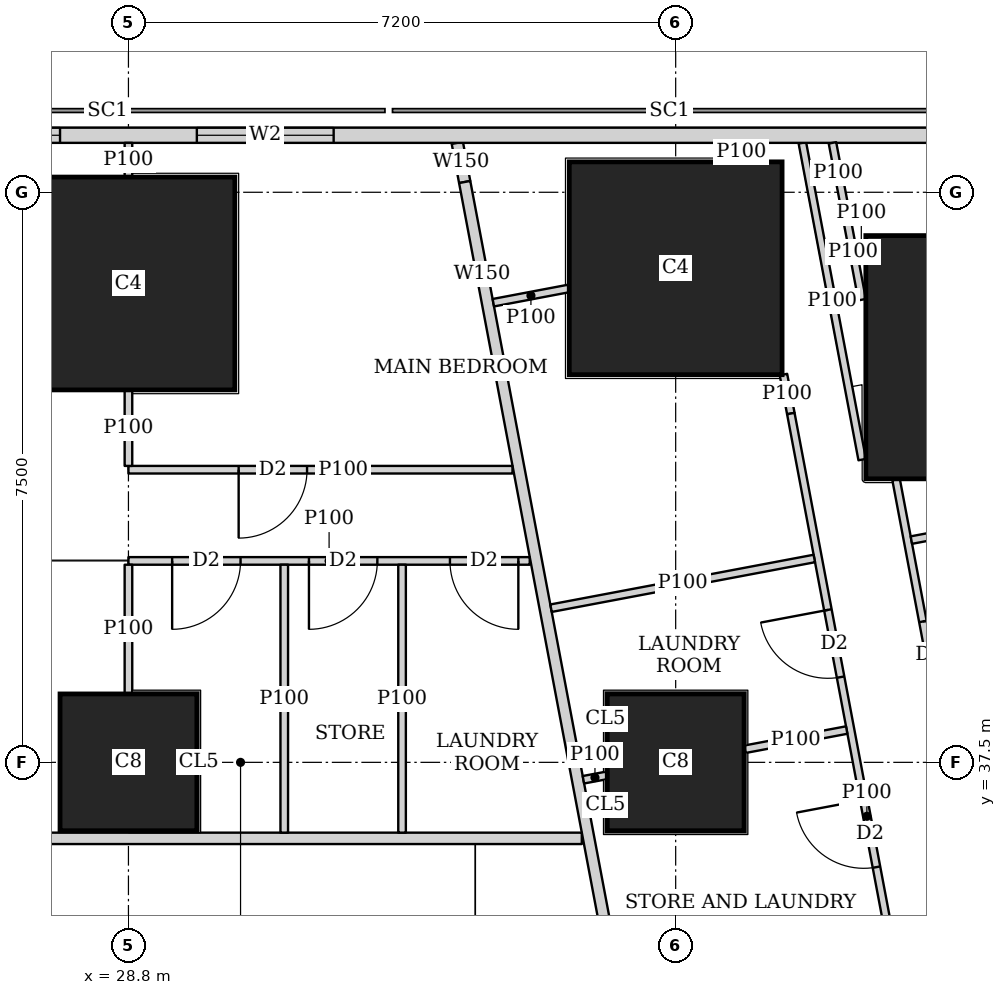
"""IFC4 building model, lengths in metres.
Left out: names, types, materials, properties, quantities, classifications, styles, units other than length and angle.
Written with IfcOpenShell. Run it as: python <this file> out.ifc"""

import sys

from ifc_helpers import new_model, si_unit, direction, frame, frame_2d, origin, origin_2d, place, context, subcontext, project, spatial, rectangle, extrude, element, fill, save


model = new_model("IFC4")
c1 = context("Model", 3, precision=1e-05, world=origin(), true_north=direction((0.0, 1.0)))
c2 = subcontext(c1, "Body", "Model", "MODEL_VIEW")
j1 = project(units=[si_unit("LENGTHUNIT", "METRE"), si_unit("PLANEANGLEUNIT", "RADIAN")], contexts=[c1])
p1 = place(None, origin())
s1 = spatial("IfcSite", under=j1, at=p1, CompositionType="ELEMENT")
p2 = place(p1, origin())
s2 = spatial("IfcBuilding", under=s1, at=p2, CompositionType="ELEMENT")
p3 = place(p2, frame((0.0, 0.0, 68.75)))
s3 = spatial("IfcBuildingStorey", under=s2, at=p3, CompositionType="ELEMENT", Elevation=68.75)
for number, where, z_axis, x_axis in (
    (1, (28.8, 37.5, 0.0), (0.0, 0.0, 1.0), (1.0, 0.0, 0.0)),
    (2, (36.0, 37.5, 0.0), (0.0, 0.0, 1.0), (1.0, 0.0, 0.0)),
):
    element("IfcColumn", number, at=place(p3, frame(where, z_axis=z_axis, x_axis=x_axis)), inside=s3, PredefinedType="COLUMN", context=c2, shape_type="SweptSolid", body=[
        extrude(rectangle(XDim=1.8, YDim=1.8, at=origin_2d()), origin(), (0.0, 0.0, 1.0), 3.75),
    ])
p4 = place(p3, frame((40.102, 42.83, 0.0), z_axis=(0.0, 0.0, 1.0), x_axis=(1.0, 0.0, 0.0)))
e3 = element("IfcColumn", 3, at=p4, inside=s3, PredefinedType="COLUMN", context=c2, shape_type="SweptSolid", body=[
    extrude(rectangle(XDim=3.2, YDim=3.2, at=origin_2d()), origin(), (0.0, 0.0, 1.0), 3.75),
])
for number, where, z_axis, x_axis in (
    (4, (28.8, 43.8, 0.0), (0.0, 0.0, 1.0), (1.0, 0.0, 0.0)),
    (5, (36.0, 44.0, 0.0), (0.0, 0.0, 1.0), (1.0, 0.0, 0.0)),
):
    element("IfcColumn", number, at=place(p3, frame(where, z_axis=z_axis, x_axis=x_axis)), inside=s3, PredefinedType="COLUMN", context=c2, shape_type="SweptSolid", body=[
        extrude(rectangle(XDim=2.8, YDim=2.8, at=origin_2d()), origin(), (0.0, 0.0, 1.0), 3.75),
    ])
p5 = place(p3, frame((40.106, 45.75, 0.0), z_axis=(0.0, 0.0, 1.0), x_axis=(-1.0, 0.0, 0.0)))
e6 = element("IfcWall", 6, at=p5, inside=s3, PredefinedType="SOLIDWALL", context=c2, shape_type="SweptSolid", body=[
    extrude(rectangle(XDim=37.943, YDim=0.2, at=frame_2d((18.971, 0.0))), origin(), (0.0, 0.0, 1.0), 3.45),
])
p6 = place(p5, frame((8.606, 0.0, 0.9)))
e7 = element("IfcOpeningElement", 7, at=p6, cuts=e6, PredefinedType="OPENING", context=c2, shape_type="SweptSolid", body=[
    extrude(rectangle(XDim=1.8, YDim=1.5, at=frame_2d((0.9, 0.75))), frame((0.0, 0.11, 0.0), z_axis=(0.0, -1.0, 0.0), x_axis=(1.0, 0.0, 0.0)), (0.0, 0.0, 1.0), 0.22),
])
p7 = place(p5, frame((12.206, 0.0, 0.9)))
e8 = element("IfcOpeningElement", 8, at=p7, cuts=e6, PredefinedType="OPENING", context=c2, shape_type="SweptSolid", body=[
    extrude(rectangle(XDim=1.8, YDim=1.5, at=frame_2d((0.9, 0.75))), frame((0.0, 0.11, 0.0), z_axis=(0.0, -1.0, 0.0), x_axis=(1.0, 0.0, 0.0)), (0.0, 0.0, 1.0), 0.22),
])
p8 = place(p5, frame((15.806, 0.0, 0.9)))
e9 = element("IfcOpeningElement", 9, at=p8, cuts=e6, PredefinedType="OPENING", context=c2, shape_type="SweptSolid", body=[
    extrude(rectangle(XDim=1.8, YDim=1.5, at=frame_2d((0.9, 0.75))), frame((0.0, 0.11, 0.0), z_axis=(0.0, -1.0, 0.0), x_axis=(1.0, 0.0, 0.0)), (0.0, 0.0, 1.0), 0.22),
])
p9 = place(p5, frame((19.406, 0.0, 0.9)))
e10 = element("IfcOpeningElement", 10, at=p9, cuts=e6, PredefinedType="OPENING", context=c2, shape_type="SweptSolid", body=[
    extrude(rectangle(XDim=1.8, YDim=1.5, at=frame_2d((0.9, 0.75))), frame((0.0, 0.11, 0.0), z_axis=(0.0, -1.0, 0.0), x_axis=(1.0, 0.0, 0.0)), (0.0, 0.0, 1.0), 0.22),
])
p10 = place(p5, frame((23.006, 0.0, 0.9)))
e11 = element("IfcOpeningElement", 11, at=p10, cuts=e6, PredefinedType="OPENING", context=c2, shape_type="SweptSolid", body=[
    extrude(rectangle(XDim=1.8, YDim=1.5, at=frame_2d((0.9, 0.75))), frame((0.0, 0.11, 0.0), z_axis=(0.0, -1.0, 0.0), x_axis=(1.0, 0.0, 0.0)), (0.0, 0.0, 1.0), 0.22),
])
p11 = place(p5, frame((26.606, 0.0, 0.9)))
e12 = element("IfcOpeningElement", 12, at=p11, cuts=e6, PredefinedType="OPENING", context=c2, shape_type="SweptSolid", body=[
    extrude(rectangle(XDim=1.8, YDim=1.5, at=frame_2d((0.9, 0.75))), frame((0.0, 0.11, 0.0), z_axis=(0.0, -1.0, 0.0), x_axis=(1.0, 0.0, 0.0)), (0.0, 0.0, 1.0), 0.22),
])
p12 = place(p3, frame((8.35, 36.5, 0.0), z_axis=(0.0, 0.0, 1.0), x_axis=(1.0, 0.0, 0.0)))
e13 = element("IfcWall", 13, at=p12, inside=s3, PredefinedType="SOLIDWALL", context=c2, shape_type="SweptSolid", body=[
    extrude(rectangle(XDim=26.415, YDim=0.15, at=frame_2d((13.208, 0.0))), origin(), (0.0, 0.0, 1.0), 3.45),
])
p13 = place(p12, frame((2.6, 0.0, 0.0)))
e14 = element("IfcOpeningElement", 14, at=p13, cuts=e13, PredefinedType="OPENING", context=c2, shape_type="SweptSolid", body=[
    extrude(rectangle(XDim=1.0, YDim=2.1, at=frame_2d((0.5, 1.05))), frame((0.0, 0.085, 0.0), z_axis=(0.0, -1.0, 0.0), x_axis=(1.0, 0.0, 0.0)), (0.0, 0.0, 1.0), 0.17),
])
p14 = place(p12, frame((10.949, 0.0, 0.0)))
e15 = element("IfcOpeningElement", 15, at=p14, cuts=e13, PredefinedType="OPENING", context=c2, shape_type="SweptSolid", body=[
    extrude(rectangle(XDim=1.0, YDim=2.1, at=frame_2d((0.5, 1.05))), frame((0.0, 0.085, 0.0), z_axis=(0.0, -1.0, 0.0), x_axis=(1.0, 0.0, 0.0)), (0.0, 0.0, 1.0), 0.17),
])
p15 = place(p12, frame((18.149, 0.0, 0.0)))
e16 = element("IfcOpeningElement", 16, at=p15, cuts=e13, PredefinedType="OPENING", context=c2, shape_type="SweptSolid", body=[
    extrude(rectangle(XDim=1.0, YDim=2.1, at=frame_2d((0.5, 1.05))), frame((0.0, 0.085, 0.0), z_axis=(0.0, -1.0, 0.0), x_axis=(1.0, 0.0, 0.0)), (0.0, 0.0, 1.0), 0.17),
])
p16 = place(p3, frame((33.127, 45.65, 0.0), z_axis=(0.0, 0.0, 1.0), x_axis=(0.185441815104, -0.982655246366, 0.0)))
e17 = element("IfcWall", 17, at=p16, inside=s3, PredefinedType="SOLIDWALL", context=c2, shape_type="SweptSolid", body=[
    extrude(rectangle(XDim=0.524, YDim=0.15, at=frame_2d((0.262, 0.0))), origin(), (0.0, 0.0, 1.0), 3.45),
])
p17 = place(p3, frame((33.224, 45.135, 0.0), z_axis=(0.0, 0.0, 1.0), x_axis=(0.185681462868, -0.982609990967, 0.0)))
e18 = element("IfcWall", 18, at=p17, inside=s3, PredefinedType="SOLIDWALL", context=c2, shape_type="SweptSolid", body=[
    extrude(rectangle(XDim=2.455, YDim=0.15, at=frame_2d((1.228, 0.0))), origin(), (0.0, 0.0, 1.0), 2.0),
])
p18 = place(p3, frame((33.68, 42.723, 0.0), z_axis=(0.0, 0.0, 1.0), x_axis=(0.185624129307, -0.98262082342, 0.0)))
e19 = element("IfcWall", 19, at=p18, inside=s3, PredefinedType="SOLIDWALL", context=c2, shape_type="SweptSolid", body=[
    extrude(rectangle(XDim=41.051, YDim=0.15, at=frame_2d((20.526, 0.0))), origin(), (0.0, 0.0, 1.0), 2.45),
])
p19 = place(p18, frame((13.577, 0.0, 0.0)))
e20 = element("IfcOpeningElement", 20, at=p19, cuts=e19, PredefinedType="OPENING", context=c2, shape_type="SweptSolid", body=[
    extrude(rectangle(XDim=1.0, YDim=2.1, at=frame_2d((0.5, 1.05))), frame((0.0, 0.085, 0.0), z_axis=(0.0, -1.0, 0.0), x_axis=(1.0, 0.0, 0.0)), (0.0, 0.0, 1.0), 0.17),
])
p20 = place(p18, frame((17.394, 0.0, 0.0)))
e21 = element("IfcOpeningElement", 21, at=p20, cuts=e19, PredefinedType="OPENING", context=c2, shape_type="SweptSolid", body=[
    extrude(rectangle(XDim=1.0, YDim=2.1, at=frame_2d((0.5, 1.05))), frame((0.0, 0.085, 0.0), z_axis=(0.0, -1.0, 0.0), x_axis=(1.0, 0.0, 0.0)), (0.0, 0.0, 1.0), 0.17),
])
p21 = place(p18, frame((26.758, 0.0, 0.0)))
e22 = element("IfcOpeningElement", 22, at=p21, cuts=e19, PredefinedType="OPENING", context=c2, shape_type="SweptSolid", body=[
    extrude(rectangle(XDim=1.0, YDim=2.1, at=frame_2d((0.5, 1.05))), frame((0.0, 0.085, 0.0), z_axis=(0.0, -1.0, 0.0), x_axis=(1.0, 0.0, 0.0)), (0.0, 0.0, 1.0), 0.17),
])
p22 = place(p18, frame((32.193, 0.0, 0.0)))
e23 = element("IfcOpeningElement", 23, at=p22, cuts=e19, PredefinedType="OPENING", context=c2, shape_type="SweptSolid", body=[
    extrude(rectangle(XDim=1.0, YDim=2.1, at=frame_2d((0.5, 1.05))), frame((0.0, 0.085, 0.0), z_axis=(0.0, -1.0, 0.0), x_axis=(1.0, 0.0, 0.0)), (0.0, 0.0, 1.0), 0.17),
])
p23 = place(p3, frame((38.454, 41.483, 0.0), z_axis=(0.0, 0.0, 1.0), x_axis=(-0.185609245326, 0.982623634994, 0.0)))
e24 = element("IfcWall", 24, at=p23, inside=s3, PredefinedType="PARTITIONING", context=c2, shape_type="SweptSolid", body=[
    extrude(rectangle(XDim=4.241, YDim=0.1, at=frame_2d((2.12, 0.0))), origin(), (0.0, 0.0, 1.0), 2.0),
])
p24 = place(p3, frame((38.063, 45.65, 0.0), z_axis=(0.0, 0.0, 1.0), x_axis=(0.186109918919, -0.982528929895, 0.0)))
e25 = element("IfcWall", 25, at=p24, inside=s3, PredefinedType="PARTITIONING", context=c2, shape_type="SweptSolid", body=[
    extrude(rectangle(XDim=0.817, YDim=0.1, at=frame_2d((0.409, 0.0))), origin(), (0.0, 0.0, 1.0), 3.45),
])
p25 = place(p3, frame((38.215, 44.847, 0.0), z_axis=(0.0, 0.0, 1.0), x_axis=(0.185449486507, -0.982653798626, 0.0)))
e26 = element("IfcWall", 26, at=p25, inside=s3, PredefinedType="PARTITIONING", context=c2, shape_type="SweptSolid", body=[
    extrude(rectangle(XDim=1.282, YDim=0.1, at=frame_2d((0.641, 0.0))), origin(), (0.0, 0.0, 1.0), 2.0),
])
p26 = place(p3, frame((38.9, 41.22, 0.0), z_axis=(0.0, 0.0, 1.0), x_axis=(0.185595712897, -0.982626191059, 0.0)))
e27 = element("IfcWall", 27, at=p26, inside=s3, PredefinedType="PARTITIONING", context=c2, shape_type="SweptSolid", body=[
    extrude(rectangle(XDim=8.524, YDim=0.1, at=frame_2d((4.262, 0.0))), origin(), (0.0, 0.0, 1.0), 3.45),
])
p27 = place(p26, frame((7.352, 0.0, 0.0)))
e28 = element("IfcOpeningElement", 28, at=p27, cuts=e27, PredefinedType="OPENING", context=c2, shape_type="SweptSolid", body=[
    extrude(rectangle(XDim=0.9, YDim=2.1, at=frame_2d((0.45, 1.05))), frame((0.0, 0.06, 0.0), z_axis=(0.0, -1.0, 0.0), x_axis=(1.0, 0.0, 0.0)), (0.0, 0.0, 1.0), 0.12),
])
p28 = place(p26, frame((1.9, 0.0, 0.0)))
e29 = element("IfcOpeningElement", 29, at=p28, cuts=e27, PredefinedType="OPENING", context=c2, shape_type="SweptSolid", body=[
    extrude(rectangle(XDim=0.9, YDim=2.1, at=frame_2d((0.45, 1.05))), frame((0.0, 0.06, 0.0), z_axis=(0.0, -1.0, 0.0), x_axis=(1.0, 0.0, 0.0)), (0.0, 0.0, 1.0), 0.12),
])
p29 = place(p3, frame((36.842, 45.65, 0.0), z_axis=(0.0, 0.0, 1.0), x_axis=(0.183986661451, -0.982928740249, 0.0)))
e30 = element("IfcWall", 30, at=p29, inside=s3, PredefinedType="PARTITIONING", context=c2, shape_type="SweptSolid", body=[
    extrude(rectangle(XDim=0.244, YDim=0.1, at=frame_2d((0.122, 0.0))), origin(), (0.0, 0.0, 1.0), 3.45),
])
p30 = place(p3, frame((37.418, 42.602, 0.0), z_axis=(0.0, 0.0, 1.0), x_axis=(0.185672001976, -0.982611778721, 0.0)))
e31 = element("IfcWall", 31, at=p30, inside=s3, PredefinedType="PARTITIONING", context=c2, shape_type="SweptSolid", body=[
    extrude(rectangle(XDim=0.522, YDim=0.1, at=frame_2d((0.261, 0.0))), origin(), (0.0, 0.0, 1.0), 2.0),
])
p31 = place(p3, frame((37.515, 42.089, 0.0), z_axis=(0.0, 0.0, 1.0), x_axis=(0.185565000991, -0.982631991341, 0.0)))
e32 = element("IfcWall", 32, at=p31, inside=s3, PredefinedType="PARTITIONING", context=c2, shape_type="SweptSolid", body=[
    extrude(rectangle(XDim=10.784, YDim=0.1, at=frame_2d((5.392, 0.0))), origin(), (0.0, 0.0, 1.0), 3.45),
])
p32 = place(p31, frame((9.358, 0.0, 0.0)))
e33 = element("IfcOpeningElement", 33, at=p32, cuts=e32, PredefinedType="OPENING", context=c2, shape_type="SweptSolid", body=[
    extrude(rectangle(XDim=0.9, YDim=2.1, at=frame_2d((0.45, 1.05))), frame((0.0, 0.06, 0.0), z_axis=(0.0, -1.0, 0.0), x_axis=(1.0, 0.0, 0.0)), (0.0, 0.0, 1.0), 0.12),
])
p33 = place(p31, frame((5.173, 0.0, 0.0)))
e34 = element("IfcOpeningElement", 34, at=p33, cuts=e32, PredefinedType="OPENING", context=c2, shape_type="SweptSolid", body=[
    extrude(rectangle(XDim=0.9, YDim=2.1, at=frame_2d((0.45, 1.05))), frame((0.0, 0.06, 0.0), z_axis=(0.0, -1.0, 0.0), x_axis=(1.0, 0.0, 0.0)), (0.0, 0.0, 1.0), 0.12),
])
p34 = place(p31, frame((2.629, 0.0, 0.0)))
e35 = element("IfcOpeningElement", 35, at=p34, cuts=e32, PredefinedType="OPENING", context=c2, shape_type="SweptSolid", body=[
    extrude(rectangle(XDim=0.9, YDim=2.1, at=frame_2d((0.45, 1.05))), frame((0.0, 0.06, 0.0), z_axis=(0.0, -1.0, 0.0), x_axis=(1.0, 0.0, 0.0)), (0.0, 0.0, 1.0), 0.12),
])
p35 = place(p31, frame((7.451, 0.0, 0.0)))
e36 = element("IfcOpeningElement", 36, at=p35, cuts=e32, PredefinedType="OPENING", context=c2, shape_type="SweptSolid", body=[
    extrude(rectangle(XDim=0.9, YDim=2.1, at=frame_2d((0.45, 1.05))), frame((0.0, 0.06, 0.0), z_axis=(0.0, -1.0, 0.0), x_axis=(1.0, 0.0, 0.0)), (0.0, 0.0, 1.0), 0.12),
])
p36 = place(p3, frame((38.492, 44.193, 0.0), z_axis=(0.0, 0.0, 1.0), x_axis=(-0.981954528773, -0.189117168504, 0.0)))
e37 = element("IfcWall", 37, at=p36, inside=s3, PredefinedType="PARTITIONING", context=c2, shape_type="SweptSolid", body=[
    extrude(rectangle(XDim=0.101, YDim=0.1, at=frame_2d((0.05, 0.0))), origin(), (0.0, 0.0, 1.0), 2.0),
])
p37 = place(p3, frame((43.277, 41.212, 0.0), z_axis=(0.0, 0.0, 1.0), x_axis=(-0.982665405803, -0.185387972203, 0.0)))
e38 = element("IfcWall", 38, at=p37, inside=s3, PredefinedType="PARTITIONING", context=c2, shape_type="SweptSolid", body=[
    extrude(rectangle(XDim=4.25, YDim=0.1, at=frame_2d((2.125, 0.0))), origin(), (0.0, 0.0, 1.0), 2.0),
])
p38 = place(p3, frame((34.59, 43.734, 0.0), z_axis=(0.0, 0.0, 1.0), x_axis=(-0.982632457012, -0.185562535081, 0.0)))
e39 = element("IfcWall", 39, at=p38, inside=s3, PredefinedType="PARTITIONING", context=c2, shape_type="SweptSolid", body=[
    extrude(rectangle(XDim=1.007, YDim=0.1, at=frame_2d((0.503, 0.0))), origin(), (0.0, 0.0, 1.0), 2.0),
])
p39 = place(p3, frame((37.824, 40.182, 0.0), z_axis=(0.0, 0.0, 1.0), x_axis=(-0.982648794755, -0.185475998897, 0.0)))
e40 = element("IfcWall", 40, at=p39, inside=s3, PredefinedType="PARTITIONING", context=c2, shape_type="SweptSolid", body=[
    extrude(rectangle(XDim=3.525, YDim=0.1, at=frame_2d((1.763, 0.0))), origin(), (0.0, 0.0, 1.0), 3.45),
])
p40 = place(p3, frame((38.25, 37.925, 0.0), z_axis=(0.0, 0.0, 1.0), x_axis=(-0.982650574676, -0.185466568658, 0.0)))
e41 = element("IfcWall", 41, at=p40, inside=s3, PredefinedType="PARTITIONING", context=c2, shape_type="SweptSolid", body=[
    extrude(rectangle(XDim=1.364, YDim=0.1, at=frame_2d((0.682, 0.0))), origin(), (0.0, 0.0, 1.0), 3.45),
])
p41 = place(p3, frame((35.09, 37.328, 0.0), z_axis=(0.0, 0.0, 1.0), x_axis=(-0.982961380226, -0.183812200315, 0.0)))
e42 = element("IfcWall", 42, at=p41, inside=s3, PredefinedType="PARTITIONING", context=c2, shape_type="SweptSolid", body=[
    extrude(rectangle(XDim=0.31, YDim=0.1, at=frame_2d((0.155, 0.0))), origin(), (0.0, 0.0, 1.0), 3.45),
])
p42 = place(p3, frame((28.8, 41.35, 0.0), z_axis=(0.0, 0.0, 1.0), x_axis=(1.0, 0.0, 0.0)))
e43 = element("IfcWall", 43, at=p42, inside=s3, PredefinedType="PARTITIONING", context=c2, shape_type="SweptSolid", body=[
    extrude(rectangle(XDim=5.053, YDim=0.1, at=frame_2d((2.526, 0.0))), origin(), (0.0, 0.0, 1.0), 3.45),
])
p43 = place(p42, frame((1.45, 0.0, 0.0)))
e44 = element("IfcOpeningElement", 44, at=p43, cuts=e43, PredefinedType="OPENING", context=c2, shape_type="SweptSolid", body=[
    extrude(rectangle(XDim=0.9, YDim=2.1, at=frame_2d((0.45, 1.05))), frame((0.0, 0.06, 0.0), z_axis=(0.0, -1.0, 0.0), x_axis=(1.0, 0.0, 0.0)), (0.0, 0.0, 1.0), 0.12),
])
p44 = place(p3, frame((28.8, 40.15, 0.0), z_axis=(0.0, 0.0, 1.0), x_axis=(1.0, 0.0, 0.0)))
e45 = element("IfcWall", 45, at=p44, inside=s3, PredefinedType="PARTITIONING", context=c2, shape_type="SweptSolid", body=[
    extrude(rectangle(XDim=5.28, YDim=0.1, at=frame_2d((2.64, 0.0))), origin(), (0.0, 0.0, 1.0), 3.45),
])
p45 = place(p44, frame((0.575, 0.0, 0.0)))
e46 = element("IfcOpeningElement", 46, at=p45, cuts=e45, PredefinedType="OPENING", context=c2, shape_type="SweptSolid", body=[
    extrude(rectangle(XDim=0.9, YDim=2.1, at=frame_2d((0.45, 1.05))), frame((0.0, 0.06, 0.0), z_axis=(0.0, -1.0, 0.0), x_axis=(1.0, 0.0, 0.0)), (0.0, 0.0, 1.0), 0.12),
])
p46 = place(p44, frame((4.23, 0.0, 0.0)))
e47 = element("IfcOpeningElement", 47, at=p46, cuts=e45, PredefinedType="OPENING", context=c2, shape_type="SweptSolid", body=[
    extrude(rectangle(XDim=0.9, YDim=2.1, at=frame_2d((0.45, 1.05))), frame((0.0, 0.06, 0.0), z_axis=(0.0, -1.0, 0.0), x_axis=(1.0, 0.0, 0.0)), (0.0, 0.0, 1.0), 0.12),
])
p47 = place(p44, frame((2.375, 0.0, 0.0)))
e48 = element("IfcOpeningElement", 48, at=p47, cuts=e45, PredefinedType="OPENING", context=c2, shape_type="SweptSolid", body=[
    extrude(rectangle(XDim=0.9, YDim=2.1, at=frame_2d((0.45, 1.05))), frame((0.0, 0.06, 0.0), z_axis=(0.0, -1.0, 0.0), x_axis=(1.0, 0.0, 0.0)), (0.0, 0.0, 1.0), 0.12),
])
p48 = place(p3, frame((28.8, 41.4, 0.0), z_axis=(0.0, 0.0, 1.0), x_axis=(0.0, 1.0, 0.0)))
e49 = element("IfcWall", 49, at=p48, inside=s3, PredefinedType="PARTITIONING", context=c2, shape_type="SweptSolid", body=[
    extrude(rectangle(XDim=0.999, YDim=0.1, at=frame_2d((0.5, 0.0))), origin(), (0.0, 0.0, 1.0), 3.45),
])
p49 = place(p3, frame((28.8, 45.201, 0.0), z_axis=(0.0, 0.0, 1.0), x_axis=(0.0, 1.0, 0.0)))
e50 = element("IfcWall", 50, at=p49, inside=s3, PredefinedType="PARTITIONING", context=c2, shape_type="SweptSolid", body=[
    extrude(rectangle(XDim=0.449, YDim=0.1, at=frame_2d((0.225, 0.0))), origin(), (0.0, 0.0, 1.0), 3.45),
])
p50 = place(p3, frame((28.8, 38.401, 0.0), z_axis=(0.0, 0.0, 1.0), x_axis=(0.0, 1.0, 0.0)))
e51 = element("IfcWall", 51, at=p50, inside=s3, PredefinedType="PARTITIONING", context=c2, shape_type="SweptSolid", body=[
    extrude(rectangle(XDim=1.699, YDim=0.1, at=frame_2d((0.85, 0.0))), origin(), (0.0, 0.0, 1.0), 3.45),
])
for number, where, z_axis, x_axis in (
    (52, (32.4, 36.575, 0.0), (0.0, 0.0, 1.0), (0.0, 1.0, 0.0)),
    (53, (30.85, 36.575, 0.0), (0.0, 0.0, 1.0), (0.0, 1.0, 0.0)),
):
    element("IfcWall", number, at=place(p3, frame(where, z_axis=z_axis, x_axis=x_axis)), inside=s3, PredefinedType="PARTITIONING", context=c2, shape_type="SweptSolid", body=[
        extrude(rectangle(XDim=3.525, YDim=0.1, at=frame_2d((1.763, 0.0))), origin(), (0.0, 0.0, 1.0), 3.45),
    ])
p51 = place(p6, origin())
e54 = element("IfcWindow", 54, at=p51, inside=s3, PartitioningType="SINGLE_PANEL", PredefinedType="WINDOW", context=c2, shape_type="SweptSolid", body=[
    extrude(rectangle(XDim=1.8, YDim=1.5, at=frame_2d((0.9, 0.75))), frame((0.0, 0.03, 0.0), z_axis=(0.0, -1.0, 0.0), x_axis=(1.0, 0.0, 0.0)), (0.0, 0.0, 1.0), 0.06),
])
fill(e7, e54)
p52 = place(p7, origin())
e55 = element("IfcWindow", 55, at=p52, inside=s3, PartitioningType="SINGLE_PANEL", PredefinedType="WINDOW", context=c2, shape_type="SweptSolid", body=[
    extrude(rectangle(XDim=1.8, YDim=1.5, at=frame_2d((0.9, 0.75))), frame((0.0, 0.03, 0.0), z_axis=(0.0, -1.0, 0.0), x_axis=(1.0, 0.0, 0.0)), (0.0, 0.0, 1.0), 0.06),
])
fill(e8, e55)
p53 = place(p28, origin())
e56 = element("IfcDoor", 56, at=p53, inside=s3, OperationType="SINGLE_SWING_LEFT", PredefinedType="DOOR", context=c2, shape_type="SweptSolid", body=[
    extrude(rectangle(XDim=0.9, YDim=2.1, at=frame_2d((0.45, 1.05))), frame((0.0, 0.025, 0.0), z_axis=(0.0, -1.0, 0.0), x_axis=(1.0, 0.0, 0.0)), (0.0, 0.0, 1.0), 0.05),
])
fill(e29, e56)
p54 = place(p33, origin())
e57 = element("IfcDoor", 57, at=p54, inside=s3, OperationType="SINGLE_SWING_RIGHT", PredefinedType="DOOR", context=c2, shape_type="SweptSolid", body=[
    extrude(rectangle(XDim=0.9, YDim=2.1, at=frame_2d((0.45, 1.05))), frame((0.0, 0.025, 0.0), z_axis=(0.0, -1.0, 0.0), x_axis=(1.0, 0.0, 0.0)), (0.0, 0.0, 1.0), 0.05),
])
fill(e34, e57)
p55 = place(p34, origin())
e58 = element("IfcDoor", 58, at=p55, inside=s3, OperationType="SINGLE_SWING_RIGHT", PredefinedType="DOOR", context=c2, shape_type="SweptSolid", body=[
    extrude(rectangle(XDim=0.9, YDim=2.1, at=frame_2d((0.45, 1.05))), frame((0.0, 0.025, 0.0), z_axis=(0.0, -1.0, 0.0), x_axis=(1.0, 0.0, 0.0)), (0.0, 0.0, 1.0), 0.05),
])
fill(e35, e58)
p56 = place(p43, origin())
e59 = element("IfcDoor", 59, at=p56, inside=s3, OperationType="SINGLE_SWING_RIGHT", PredefinedType="DOOR", context=c2, shape_type="SweptSolid", body=[
    extrude(rectangle(XDim=0.9, YDim=2.1, at=frame_2d((0.45, 1.05))), frame((0.0, 0.025, 0.0), z_axis=(0.0, -1.0, 0.0), x_axis=(1.0, 0.0, 0.0)), (0.0, 0.0, 1.0), 0.05),
])
fill(e44, e59)
p57 = place(p45, origin())
e60 = element("IfcDoor", 60, at=p57, inside=s3, OperationType="SINGLE_SWING_RIGHT", PredefinedType="DOOR", context=c2, shape_type="SweptSolid", body=[
    extrude(rectangle(XDim=0.9, YDim=2.1, at=frame_2d((0.45, 1.05))), frame((0.0, 0.025, 0.0), z_axis=(0.0, -1.0, 0.0), x_axis=(1.0, 0.0, 0.0)), (0.0, 0.0, 1.0), 0.05),
])
fill(e46, e60)
p58 = place(p46, origin())
e61 = element("IfcDoor", 61, at=p58, inside=s3, OperationType="SINGLE_SWING_LEFT", PredefinedType="DOOR", context=c2, shape_type="SweptSolid", body=[
    extrude(rectangle(XDim=0.9, YDim=2.1, at=frame_2d((0.45, 1.05))), frame((0.0, 0.025, 0.0), z_axis=(0.0, -1.0, 0.0), x_axis=(1.0, 0.0, 0.0)), (0.0, 0.0, 1.0), 0.05),
])
fill(e47, e61)
p59 = place(p47, origin())
e62 = element("IfcDoor", 62, at=p59, inside=s3, OperationType="SINGLE_SWING_RIGHT", PredefinedType="DOOR", context=c2, shape_type="SweptSolid", body=[
    extrude(rectangle(XDim=0.9, YDim=2.1, at=frame_2d((0.45, 1.05))), frame((0.0, 0.025, 0.0), z_axis=(0.0, -1.0, 0.0), x_axis=(1.0, 0.0, 0.0)), (0.0, 0.0, 1.0), 0.05),
])
fill(e48, e62)
save(model, sys.argv[1])
